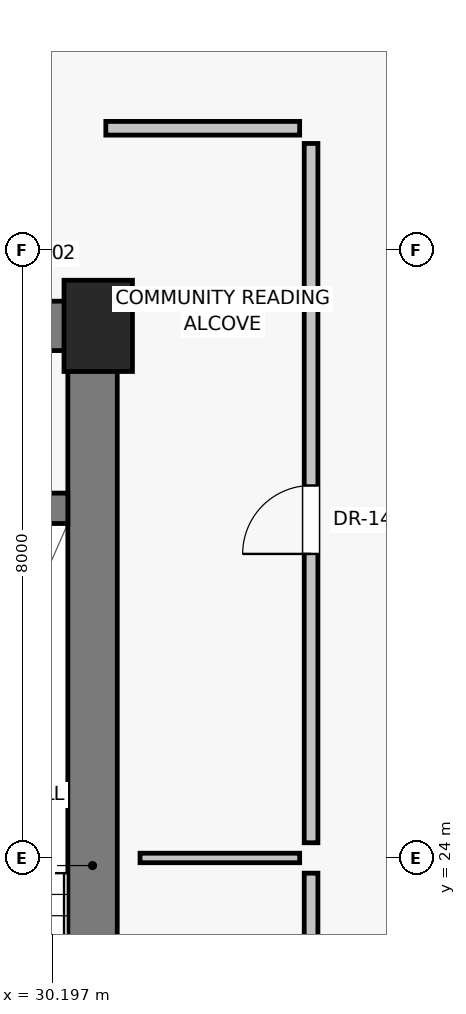
"""IFC4 building model, lengths in metres.
Left out: names, types, materials, properties, quantities, classifications, styles, units other than length and angle.
Written with IfcOpenShell. Run it as: python <this file> out.ifc"""

import sys

from ifc_helpers import new_model, si_unit, direction, frame, frame_2d, origin, origin_2d, place, context, subcontext, project, spatial, rectangle, extrude, source, transform, mapped, element, fill, save


model = new_model("IFC4")
c1 = context("Model", 3, precision=1e-05, world=origin(), true_north=direction((0.0, 1.0)))
c2 = subcontext(c1, "Body", "Model", "MODEL_VIEW")
j1 = project(units=[si_unit("LENGTHUNIT", "METRE"), si_unit("PLANEANGLEUNIT", "RADIAN")], contexts=[c1])
p1 = place(None, origin())
s1 = spatial("IfcSite", under=j1, at=p1, CompositionType="ELEMENT")
p2 = place(p1, origin())
s2 = spatial("IfcBuilding", under=s1, at=p2, CompositionType="ELEMENT")
p3 = place(p2, frame((0.0, 0.0, 92.7)))
s3 = spatial("IfcBuildingStorey", under=s2, at=p3, CompositionType="ELEMENT", Elevation=92.7)
p4 = place(p3, frame((30.8, 31.0, 0.0), z_axis=(0.0, 0.0, 1.0), x_axis=(1.0, 0.0, 0.0)))
e1 = element("IfcColumn", 1, at=p4, inside=s3, PredefinedType="PILASTER", context=c2, shape_type="SweptSolid", body=[
    extrude(rectangle(XDim=0.9, YDim=1.2, at=origin_2d()), origin(), (0.0, 0.0, 1.0), 3.25),
])
p5 = place(p3, frame((30.725, 16.8, 0.0), z_axis=(0.0, 0.0, 1.0), x_axis=(0.0, 1.0, 0.0)))
e2 = element("IfcWall", 2, at=p5, inside=s3, PredefinedType="SHEAR", context=c2, shape_type="SweptSolid", body=[
    extrude(rectangle(XDim=14.2, YDim=0.65, at=frame_2d((7.1, 0.0))), origin(), (0.0, 0.0, 1.0), 3.0),
])
p6 = place(p3, frame((27.0, 31.0, 0.0), z_axis=(0.0, 0.0, 1.0), x_axis=(1.0, 0.0, 0.0)))
e3 = element("IfcWall", 3, at=p6, inside=s3, PredefinedType="SHEAR", context=c2, shape_type="SweptSolid", body=[
    extrude(rectangle(XDim=3.8, YDim=0.65, at=frame_2d((1.9, 0.0))), origin(), (0.0, 0.0, 1.0), 3.0),
])
p7 = place(p6, frame((1.15, 0.0, 0.0)))
e4 = element("IfcOpeningElement", 4, at=p7, cuts=e3, PredefinedType="OPENING", context=c2, shape_type="SweptSolid", body=[
    extrude(rectangle(XDim=1.0, YDim=2.01, at=frame_2d((0.5, 1.005))), frame((0.0, 0.335, 0.0), z_axis=(0.0, -1.0, 0.0), x_axis=(1.0, 0.0, 0.0)), (0.0, 0.0, 1.0), 0.67),
])
p8 = place(p3, frame((27.0, 28.6, 0.0), z_axis=(0.0, 0.0, 1.0), x_axis=(1.0, 0.0, 0.0)))
e5 = element("IfcWall", 5, at=p8, inside=s3, PredefinedType="SHEAR", context=c2, shape_type="SweptSolid", body=[
    extrude(rectangle(XDim=3.4, YDim=0.4, at=frame_2d((1.7, 0.0))), origin(), (0.0, 0.0, 1.0), 3.0),
])
p9 = place(p3, frame((33.6, 14.4, 0.0), z_axis=(0.0, 0.0, 1.0), x_axis=(0.0, 1.0, 0.0)))
e6 = element("IfcWall", 6, at=p9, inside=s3, PredefinedType="PARTITIONING", context=c2, shape_type="SweptSolid", body=[
    extrude(rectangle(XDim=9.4, YDim=0.18, at=frame_2d((4.7, 0.0))), origin(), (0.0, 0.0, 1.0), 3.0),
])
p10 = place(p9, frame((3.8, 0.0, 0.0)))
e7 = element("IfcOpeningElement", 7, at=p10, cuts=e6, PredefinedType="OPENING", context=c2, shape_type="SweptSolid", body=[
    extrude(rectangle(XDim=0.9, YDim=2.01, at=frame_2d((0.45, 1.005))), frame((0.0, 0.1, 0.0), z_axis=(0.0, -1.0, 0.0), x_axis=(1.0, 0.0, 0.0)), (0.0, 0.0, 1.0), 0.2),
])
p11 = place(p3, frame((33.6, 24.2, 0.0), z_axis=(0.0, 0.0, 1.0), x_axis=(0.0, 1.0, 0.0)))
e8 = element("IfcWall", 8, at=p11, inside=s3, PredefinedType="PARTITIONING", context=c2, shape_type="SweptSolid", body=[
    extrude(rectangle(XDim=9.2, YDim=0.18, at=frame_2d((4.6, 0.0))), origin(), (0.0, 0.0, 1.0), 3.0),
])
p12 = place(p11, frame((3.8, 0.0, 0.0)))
e9 = element("IfcOpeningElement", 9, at=p12, cuts=e8, PredefinedType="OPENING", context=c2, shape_type="SweptSolid", body=[
    extrude(rectangle(XDim=0.9, YDim=2.01, at=frame_2d((0.45, 1.005))), frame((0.0, 0.1, 0.0), z_axis=(0.0, -1.0, 0.0), x_axis=(1.0, 0.0, 0.0)), (0.0, 0.0, 1.0), 0.2),
])
p13 = place(p3, frame((31.35, 24.0, 0.0), z_axis=(0.0, 0.0, 1.0), x_axis=(1.0, 0.0, 0.0)))
e10 = element("IfcWall", 10, at=p13, inside=s3, PredefinedType="PARTITIONING", context=c2, shape_type="SweptSolid", body=[
    extrude(rectangle(XDim=2.1, YDim=0.125, at=frame_2d((1.05, 0.0))), origin(), (0.0, 0.0, 1.0), 3.0),
])
p14 = place(p3, frame((30.9, 33.6, 0.0), z_axis=(0.0, 0.0, 1.0), x_axis=(1.0, 0.0, 0.0)))
e11 = element("IfcWall", 11, at=p14, inside=s3, PredefinedType="PARTITIONING", context=c2, shape_type="SweptSolid", body=[
    extrude(rectangle(XDim=2.55, YDim=0.18, at=frame_2d((1.275, 0.0))), origin(), (0.0, 0.0, 1.0), 3.0),
])
m1 = source(origin(), c2, "Body", "SweptSolid", [
    extrude(rectangle(XDim=0.9, YDim=2.01, at=frame_2d((0.45, 1.005))), frame((0.0, 0.025, 0.0), z_axis=(0.0, -1.0, 0.0), x_axis=(1.0, 0.0, 0.0)), (0.0, 0.0, 1.0), 0.05),
])
p15 = place(p12, origin())
e12 = element("IfcDoor", 12, at=p15, inside=s3, OperationType="SINGLE_SWING_LEFT", PredefinedType="DOOR", context=c2, shape_type="MappedRepresentation", body=[
    mapped(m1, transform((0.0, 0.0, 0.0), scale=1.0)),
])
fill(e9, e12)
save(model, sys.argv[1])
